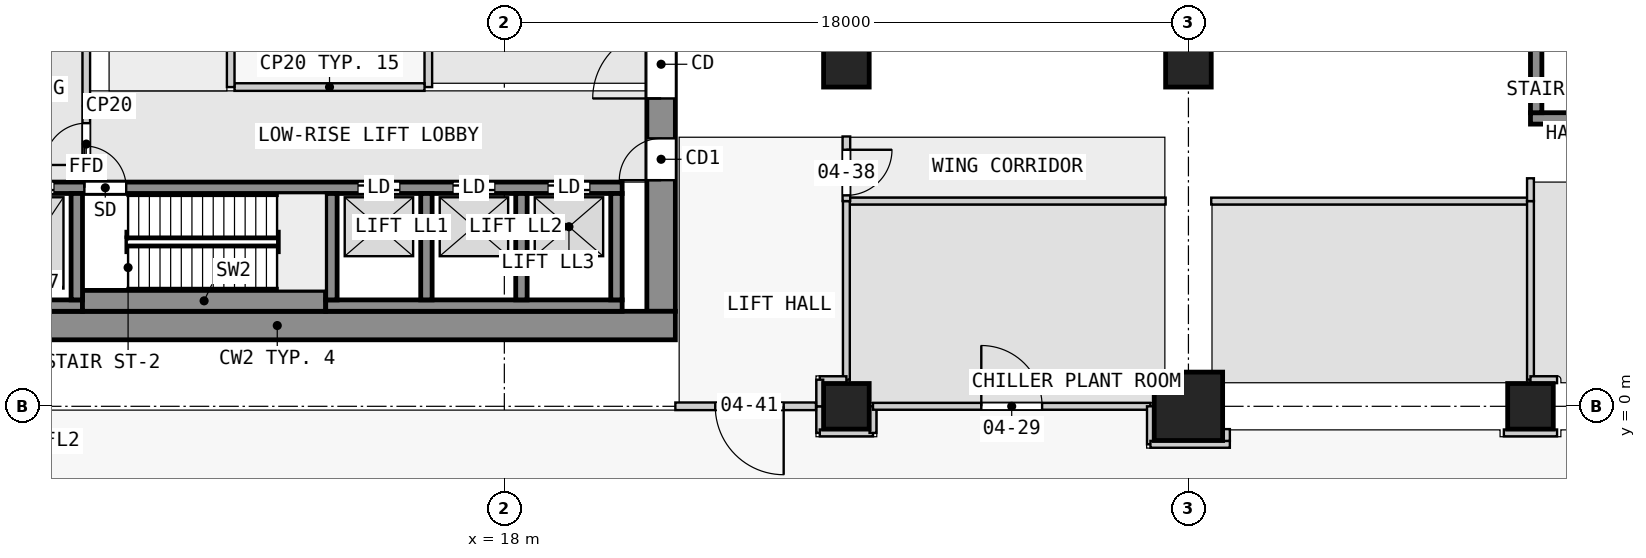
"""IFC4 building model, lengths in metres.
Left out: names, types, materials, properties, quantities, classifications, styles, units other than length and angle.
Written with IfcOpenShell. Run it as: python <this file> out.ifc"""

import sys

from ifc_helpers import new_model, si_unit, direction, frame, frame_2d, origin, origin_2d, place, context, subcontext, project, spatial, rectangle, extrude, element, fill, save


model = new_model("IFC4")
c1 = context("Model", 3, precision=1e-05, world=origin(), true_north=direction((0.0, 1.0)))
c2 = subcontext(c1, "Body", "Model", "MODEL_VIEW")
j1 = project(units=[si_unit("LENGTHUNIT", "METRE"), si_unit("PLANEANGLEUNIT", "RADIAN")], contexts=[c1])
p1 = place(None, origin())
s1 = spatial("IfcSite", under=j1, at=p1, CompositionType="ELEMENT")
p2 = place(p1, origin())
s2 = spatial("IfcBuilding", under=s1, at=p2, CompositionType="ELEMENT")
p3 = place(p2, frame((0.0, 0.0, 21.8)))
s3 = spatial("IfcBuildingStorey", under=s2, at=p3, CompositionType="ELEMENT", Elevation=21.8)
for number, where, z_axis, x_axis in (
    (1, (27.0, 0.0, 0.0), (0.0, 0.0, 1.0), (1.0, 0.0, 0.0)),
    (2, (27.0, 9.0, 0.0), (0.0, 0.0, 1.0), (1.0, 0.0, 0.0)),
):
    element("IfcColumn", number, at=place(p3, frame(where, z_axis=z_axis, x_axis=x_axis)), inside=s3, PredefinedType="COLUMN", context=c2, shape_type="SweptSolid", body=[
        extrude(rectangle(XDim=1.2, YDim=1.2, at=origin_2d()), origin(), (0.0, 0.0, 1.0), 5.0),
    ])
p4 = place(p3, frame((36.0, 0.0, 0.0), z_axis=(0.0, 0.0, 1.0), x_axis=(1.0, 0.0, 0.0)))
e3 = element("IfcColumn", 3, at=p4, inside=s3, PredefinedType="COLUMN", context=c2, shape_type="SweptSolid", body=[
    extrude(rectangle(XDim=1.8, YDim=1.8, at=origin_2d()), origin(), (0.0, 0.0, 1.0), 5.0),
])
for number, where, z_axis, x_axis in (
    (4, (36.0, 9.0, 0.0), (0.0, 0.0, 1.0), (1.0, 0.0, 0.0)),
    (5, (45.0, 0.0, 0.0), (0.0, 0.0, 1.0), (1.0, 0.0, 0.0)),
):
    element("IfcColumn", number, at=place(p3, frame(where, z_axis=z_axis, x_axis=x_axis)), inside=s3, PredefinedType="COLUMN", context=c2, shape_type="SweptSolid", body=[
        extrude(rectangle(XDim=1.2, YDim=1.2, at=origin_2d()), origin(), (0.0, 0.0, 1.0), 5.0),
    ])
p5 = place(p3, frame((1.55, 2.125, 0.0), z_axis=(0.0, 0.0, 1.0), x_axis=(1.0, 0.0, 0.0)))
e6 = element("IfcWall", 6, at=p5, inside=s3, PredefinedType="SHEAR", context=c2, shape_type="SweptSolid", body=[
    extrude(rectangle(XDim=20.95, YDim=0.75, at=frame_2d((10.475, 0.0))), origin(), (0.0, 0.0, 1.0), 4.5),
])
p6 = place(p3, frame((22.125, 2.5, 0.0), z_axis=(0.0, 0.0, 1.0), x_axis=(0.0, 1.0, 0.0)))
e7 = element("IfcWall", 7, at=p6, inside=s3, PredefinedType="SHEAR", context=c2, shape_type="SweptSolid", body=[
    extrude(rectangle(XDim=14.75, YDim=0.75, at=frame_2d((7.375, 0.0))), origin(), (0.0, 0.0, 1.0), 4.5),
])
p7 = place(p6, frame((5.6, 0.0, 0.0)))
e8 = element("IfcOpeningElement", 8, at=p7, cuts=e7, PredefinedType="OPENING", context=c2, shape_type="SweptSolid", body=[
    extrude(rectangle(XDim=1.8, YDim=2.1, at=frame_2d((0.9, 1.05))), frame((0.0, 0.385, 0.0), z_axis=(0.0, -1.0, 0.0), x_axis=(1.0, 0.0, 0.0)), (0.0, 0.0, 1.0), 0.77),
])
p8 = place(p6, frame((3.45, 0.0, 0.0)))
e9 = element("IfcOpeningElement", 9, at=p8, cuts=e7, PredefinedType="OPENING", context=c2, shape_type="SweptSolid", body=[
    extrude(rectangle(XDim=1.1, YDim=2.1, at=frame_2d((0.55, 1.05))), frame((0.0, 0.385, 0.0), z_axis=(0.0, -1.0, 0.0), x_axis=(1.0, 0.0, 0.0)), (0.0, 0.0, 1.0), 0.77),
])
p9 = place(p3, frame((2.3, 2.65, 0.0), z_axis=(0.0, 0.0, 1.0), x_axis=(1.0, 0.0, 0.0)))
e10 = element("IfcWall", 10, at=p9, inside=s3, PredefinedType="SHEAR", context=c2, shape_type="SweptSolid", body=[
    extrude(rectangle(XDim=4.6, YDim=0.3, at=frame_2d((2.3, 0.0))), origin(), (0.0, 0.0, 1.0), 4.5),
])
p10 = place(p3, frame((6.9, 2.775, 0.0), z_axis=(0.0, 0.0, 1.0), x_axis=(1.0, 0.0, 0.0)))
e11 = element("IfcWall", 11, at=p10, inside=s3, PredefinedType="SHEAR", context=c2, shape_type="SweptSolid", body=[
    extrude(rectangle(XDim=6.4, YDim=0.55, at=frame_2d((3.2, 0.0))), origin(), (0.0, 0.0, 1.0), 4.5),
])
p11 = place(p3, frame((13.3, 2.65, 0.0), z_axis=(0.0, 0.0, 1.0), x_axis=(1.0, 0.0, 0.0)))
e12 = element("IfcWall", 12, at=p11, inside=s3, PredefinedType="SHEAR", context=c2, shape_type="SweptSolid", body=[
    extrude(rectangle(XDim=7.8, YDim=0.3, at=frame_2d((3.9, 0.0))), origin(), (0.0, 0.0, 1.0), 4.5),
])
for number, where, z_axis, x_axis in (
    (13, (6.75, 2.8, 0.0), (0.0, 0.0, 1.0), (0.0, 1.0, 0.0)),
    (14, (13.45, 2.8, 0.0), (0.0, 0.0, 1.0), (0.0, 1.0, 0.0)),
    (15, (15.95, 2.8, 0.0), (0.0, 0.0, 1.0), (0.0, 1.0, 0.0)),
    (16, (18.45, 2.8, 0.0), (0.0, 0.0, 1.0), (0.0, 1.0, 0.0)),
    (17, (20.95, 2.8, 0.0), (0.0, 0.0, 1.0), (0.0, 1.0, 0.0)),
):
    element("IfcWall", number, at=place(p3, frame(where, z_axis=z_axis, x_axis=x_axis)), inside=s3, PredefinedType="SHEAR", context=c2, shape_type="SweptSolid", body=[
        extrude(rectangle(XDim=2.8, YDim=0.3, at=frame_2d((1.4, 0.0))), origin(), (0.0, 0.0, 1.0), 4.5),
    ])
p12 = place(p3, frame((2.3, 5.75, 0.0), z_axis=(0.0, 0.0, 1.0), x_axis=(1.0, 0.0, 0.0)))
e18 = element("IfcWall", 18, at=p12, inside=s3, PredefinedType="SHEAR", context=c2, shape_type="SweptSolid", body=[
    extrude(rectangle(XDim=18.8, YDim=0.3, at=frame_2d((9.4, 0.0))), origin(), (0.0, 0.0, 1.0), 4.5),
])
p13 = place(p12, frame((4.65, 0.0, 0.0)))
e19 = element("IfcOpeningElement", 19, at=p13, cuts=e18, PredefinedType="OPENING", context=c2, shape_type="SweptSolid", body=[
    extrude(rectangle(XDim=1.1, YDim=2.1, at=frame_2d((0.55, 1.05))), frame((0.0, 0.16, 0.0), z_axis=(0.0, -1.0, 0.0), x_axis=(1.0, 0.0, 0.0)), (0.0, 0.0, 1.0), 0.32),
])
p14 = place(p12, frame((0.45, 0.0, 0.0)))
e20 = element("IfcOpeningElement", 20, at=p14, cuts=e18, PredefinedType="OPENING", context=c2, shape_type="SweptSolid", body=[
    extrude(rectangle(XDim=1.1, YDim=2.1, at=frame_2d((0.55, 1.05))), frame((0.0, 0.16, 0.0), z_axis=(0.0, -1.0, 0.0), x_axis=(1.0, 0.0, 0.0)), (0.0, 0.0, 1.0), 0.32),
])
p15 = place(p12, frame((2.75, 0.0, 0.0)))
e21 = element("IfcOpeningElement", 21, at=p15, cuts=e18, PredefinedType="OPENING", context=c2, shape_type="SweptSolid", body=[
    extrude(rectangle(XDim=1.1, YDim=2.1, at=frame_2d((0.55, 1.05))), frame((0.0, 0.16, 0.0), z_axis=(0.0, -1.0, 0.0), x_axis=(1.0, 0.0, 0.0)), (0.0, 0.0, 1.0), 0.32),
])
p16 = place(p12, frame((11.85, 0.0, 0.0)))
e22 = element("IfcOpeningElement", 22, at=p16, cuts=e18, PredefinedType="OPENING", context=c2, shape_type="SweptSolid", body=[
    extrude(rectangle(XDim=1.1, YDim=2.1, at=frame_2d((0.55, 1.05))), frame((0.0, 0.16, 0.0), z_axis=(0.0, -1.0, 0.0), x_axis=(1.0, 0.0, 0.0)), (0.0, 0.0, 1.0), 0.32),
])
p17 = place(p12, frame((14.35, 0.0, 0.0)))
e23 = element("IfcOpeningElement", 23, at=p17, cuts=e18, PredefinedType="OPENING", context=c2, shape_type="SweptSolid", body=[
    extrude(rectangle(XDim=1.1, YDim=2.1, at=frame_2d((0.55, 1.05))), frame((0.0, 0.16, 0.0), z_axis=(0.0, -1.0, 0.0), x_axis=(1.0, 0.0, 0.0)), (0.0, 0.0, 1.0), 0.32),
])
p18 = place(p12, frame((16.85, 0.0, 0.0)))
e24 = element("IfcOpeningElement", 24, at=p18, cuts=e18, PredefinedType="OPENING", context=c2, shape_type="SweptSolid", body=[
    extrude(rectangle(XDim=1.1, YDim=2.1, at=frame_2d((0.55, 1.05))), frame((0.0, 0.16, 0.0), z_axis=(0.0, -1.0, 0.0), x_axis=(1.0, 0.0, 0.0)), (0.0, 0.0, 1.0), 0.32),
])
p19 = place(p3, frame((45.15, 7.725, 0.0), z_axis=(0.0, 0.0, 1.0), x_axis=(0.0, 1.0, 0.0)))
e25 = element("IfcWall", 25, at=p19, inside=s3, PredefinedType="SHEAR", context=c2, shape_type="SweptSolid", body=[
    extrude(rectangle(XDim=2.55, YDim=0.3, at=frame_2d((1.275, 0.0))), origin(), (0.0, 0.0, 1.0), 5.0),
])
p20 = place(p3, frame((45.0, 7.575, 0.0), z_axis=(0.0, 0.0, 1.0), x_axis=(1.0, 0.0, 0.0)))
e26 = element("IfcWall", 26, at=p20, inside=s3, PredefinedType="SHEAR", context=c2, shape_type="SweptSolid", body=[
    extrude(rectangle(XDim=7.2, YDim=0.3, at=frame_2d((3.6, 0.0))), origin(), (0.0, 0.0, 1.0), 5.0),
])
p21 = place(p3, frame((7.0, 5.9, 0.0), z_axis=(0.0, 0.0, 1.0), x_axis=(0.0, 1.0, 0.0)))
e27 = element("IfcWall", 27, at=p21, inside=s3, PredefinedType="PARTITIONING", context=c2, shape_type="SweptSolid", body=[
    extrude(rectangle(XDim=4.0, YDim=0.2, at=frame_2d((2.0, 0.0))), origin(), (0.0, 0.0, 1.0), 4.5),
])
p22 = place(p21, frame((0.45, 0.0, 0.0)))
e28 = element("IfcOpeningElement", 28, at=p22, cuts=e27, PredefinedType="OPENING", context=c2, shape_type="SweptSolid", body=[
    extrude(rectangle(XDim=1.1, YDim=2.1, at=frame_2d((0.55, 1.05))), frame((0.0, 0.11, 0.0), z_axis=(0.0, -1.0, 0.0), x_axis=(1.0, 0.0, 0.0)), (0.0, 0.0, 1.0), 0.22),
])
p23 = place(p3, frame((10.8, 8.4, 0.0), z_axis=(0.0, 0.0, 1.0), x_axis=(0.0, 1.0, 0.0)))
e29 = element("IfcWall", 29, at=p23, inside=s3, PredefinedType="PARTITIONING", context=c2, shape_type="SweptSolid", body=[
    extrude(rectangle(XDim=6.2, YDim=0.2, at=frame_2d((3.1, 0.0))), origin(), (0.0, 0.0, 1.0), 4.5),
])
p24 = place(p3, frame((10.9, 8.4, 0.0), z_axis=(0.0, 0.0, 1.0), x_axis=(1.0, 0.0, 0.0)))
e30 = element("IfcWall", 30, at=p24, inside=s3, PredefinedType="PARTITIONING", context=c2, shape_type="SweptSolid", body=[
    extrude(rectangle(XDim=5.0, YDim=0.2, at=frame_2d((2.5, 0.0))), origin(), (0.0, 0.0, 1.0), 4.5),
])
p25 = place(p3, frame((16.0, 8.4, 0.0), z_axis=(0.0, 0.0, 1.0), x_axis=(0.0, 1.0, 0.0)))
e31 = element("IfcWall", 31, at=p25, inside=s3, PredefinedType="PARTITIONING", context=c2, shape_type="SweptSolid", body=[
    extrude(rectangle(XDim=6.2, YDim=0.2, at=frame_2d((3.1, 0.0))), origin(), (0.0, 0.0, 1.0), 4.5),
])
p26 = place(p25, frame((3.15, 0.0, 0.0)))
e32 = element("IfcOpeningElement", 32, at=p26, cuts=e31, PredefinedType="OPENING", context=c2, shape_type="SweptSolid", body=[
    extrude(rectangle(XDim=0.9, YDim=2.1, at=frame_2d((0.45, 1.05))), frame((0.0, 0.11, 0.0), z_axis=(0.0, -1.0, 0.0), x_axis=(1.0, 0.0, 0.0)), (0.0, 0.0, 1.0), 0.22),
])
p27 = place(p3, frame((26.3, 0.0, 0.0), z_axis=(0.0, 0.0, 1.0), x_axis=(0.0, -1.0, 0.0)))
e33 = element("IfcWall", 33, at=p27, inside=s3, PredefinedType="PARTITIONING", context=c2, shape_type="SweptSolid", body=[
    extrude(rectangle(XDim=0.7, YDim=0.18, at=frame_2d((0.35, 0.0))), origin(), (0.0, 0.0, 1.0), 4.5),
])
p28 = place(p3, frame((26.3, -0.7, 0.0), z_axis=(0.0, 0.0, 1.0), x_axis=(1.0, 0.0, 0.0)))
e34 = element("IfcWall", 34, at=p28, inside=s3, PredefinedType="PARTITIONING", context=c2, shape_type="SweptSolid", body=[
    extrude(rectangle(XDim=1.4, YDim=0.18, at=frame_2d((0.7, 0.0))), origin(), (0.0, 0.0, 1.0), 4.5),
])
p29 = place(p3, frame((27.7, -0.7, 0.0), z_axis=(0.0, 0.0, 1.0), x_axis=(0.0, 1.0, 0.0)))
e35 = element("IfcWall", 35, at=p29, inside=s3, PredefinedType="PARTITIONING", context=c2, shape_type="SweptSolid", body=[
    extrude(rectangle(XDim=0.7, YDim=0.18, at=frame_2d((0.35, 0.0))), origin(), (0.0, 0.0, 1.0), 4.5),
])
p30 = place(p3, frame((27.7, 0.0, 0.0), z_axis=(0.0, 0.0, 1.0), x_axis=(1.0, 0.0, 0.0)))
e36 = element("IfcWall", 36, at=p30, inside=s3, PredefinedType="PARTITIONING", context=c2, shape_type="SweptSolid", body=[
    extrude(rectangle(XDim=7.3, YDim=0.18, at=frame_2d((3.65, 0.0))), origin(), (0.0, 0.0, 1.0), 4.5),
])
p31 = place(p30, frame((2.85, 0.0, 0.0)))
e37 = element("IfcOpeningElement", 37, at=p31, cuts=e36, PredefinedType="OPENING", context=c2, shape_type="SweptSolid", body=[
    extrude(rectangle(XDim=1.6, YDim=2.4, at=frame_2d((0.8, 1.2))), frame((0.0, 0.1, 0.0), z_axis=(0.0, -1.0, 0.0), x_axis=(1.0, 0.0, 0.0)), (0.0, 0.0, 1.0), 0.2),
])
p32 = place(p3, frame((35.0, 0.0, 0.0), z_axis=(0.0, 0.0, 1.0), x_axis=(0.0, -1.0, 0.0)))
e38 = element("IfcWall", 38, at=p32, inside=s3, PredefinedType="PARTITIONING", context=c2, shape_type="SweptSolid", body=[
    extrude(rectangle(XDim=1.0, YDim=0.18, at=frame_2d((0.5, 0.0))), origin(), (0.0, 0.0, 1.0), 4.5),
])
p33 = place(p3, frame((35.0, -1.0, 0.0), z_axis=(0.0, 0.0, 1.0), x_axis=(1.0, 0.0, 0.0)))
e39 = element("IfcWall", 39, at=p33, inside=s3, PredefinedType="PARTITIONING", context=c2, shape_type="SweptSolid", body=[
    extrude(rectangle(XDim=2.09, YDim=0.18, at=frame_2d((1.045, 0.0))), origin(), (0.0, 0.0, 1.0), 4.5),
])
p34 = place(p3, frame((37.0, -0.91, 0.0), z_axis=(0.0, 0.0, 1.0), x_axis=(0.0, 1.0, 0.0)))
e40 = element("IfcWall", 40, at=p34, inside=s3, PredefinedType="PARTITIONING", context=c2, shape_type="SweptSolid", body=[
    extrude(rectangle(XDim=0.31, YDim=0.18, at=frame_2d((0.155, 0.0))), origin(), (0.0, 0.0, 1.0), 4.5),
])
p35 = place(p3, frame((44.3, -0.7, 0.0), z_axis=(0.0, 0.0, 1.0), x_axis=(1.0, 0.0, 0.0)))
e41 = element("IfcWall", 41, at=p35, inside=s3, PredefinedType="PARTITIONING", context=c2, shape_type="SweptSolid", body=[
    extrude(rectangle(XDim=1.4, YDim=0.18, at=frame_2d((0.7, 0.0))), origin(), (0.0, 0.0, 1.0), 4.5),
])
for number, where, z_axis, x_axis in (
    (42, (35.4, 5.4, 0.0), (0.0, 0.0, 1.0), (-1.0, 0.0, 0.0)),
    (43, (45.0, 5.4, 0.0), (0.0, 0.0, 1.0), (-1.0, 0.0, 0.0)),
):
    element("IfcWall", number, at=place(p3, frame(where, z_axis=z_axis, x_axis=x_axis)), inside=s3, PredefinedType="PARTITIONING", context=c2, shape_type="SweptSolid", body=[
        extrude(rectangle(XDim=8.4, YDim=0.18, at=frame_2d((4.2, 0.0))), origin(), (0.0, 0.0, 1.0), 4.5),
    ])
p36 = place(p3, frame((27.0, 5.4, 0.0), z_axis=(0.0, 0.0, 1.0), x_axis=(0.0, -1.0, 0.0)))
e44 = element("IfcWall", 44, at=p36, inside=s3, PredefinedType="PARTITIONING", context=c2, shape_type="SweptSolid", body=[
    extrude(rectangle(XDim=4.7, YDim=0.18, at=frame_2d((2.35, 0.0))), origin(), (0.0, 0.0, 1.0), 4.5),
])
for number, where, z_axis, x_axis in (
    (45, (27.0, 0.7, 0.0), (0.0, 0.0, 1.0), (-1.0, 0.0, 0.0)),
    (46, (26.3, 0.7, 0.0), (0.0, 0.0, 1.0), (0.0, -1.0, 0.0)),
):
    element("IfcWall", number, at=place(p3, frame(where, z_axis=z_axis, x_axis=x_axis)), inside=s3, PredefinedType="PARTITIONING", context=c2, shape_type="SweptSolid", body=[
        extrude(rectangle(XDim=0.7, YDim=0.18, at=frame_2d((0.35, 0.0))), origin(), (0.0, 0.0, 1.0), 4.5),
    ])
p37 = place(p3, frame((45.0, 5.4, 0.0), z_axis=(0.0, 0.0, 1.0), x_axis=(0.0, -1.0, 0.0)))
e47 = element("IfcWall", 47, at=p37, inside=s3, PredefinedType="PARTITIONING", context=c2, shape_type="SweptSolid", body=[
    extrude(rectangle(XDim=4.7, YDim=0.18, at=frame_2d((2.35, 0.0))), origin(), (0.0, 0.0, 1.0), 4.5),
])
p38 = place(p3, frame((45.0, 0.7, 0.0), z_axis=(0.0, 0.0, 1.0), x_axis=(1.0, 0.0, 0.0)))
e48 = element("IfcWall", 48, at=p38, inside=s3, PredefinedType="PARTITIONING", context=c2, shape_type="SweptSolid", body=[
    extrude(rectangle(XDim=0.7, YDim=0.18, at=frame_2d((0.35, 0.0))), origin(), (0.0, 0.0, 1.0), 4.5),
])
p39 = place(p3, frame((27.0, 7.1, 0.0), z_axis=(0.0, 0.0, 1.0), x_axis=(0.0, -1.0, 0.0)))
e49 = element("IfcWall", 49, at=p39, inside=s3, PredefinedType="PARTITIONING", context=c2, shape_type="SweptSolid", body=[
    extrude(rectangle(XDim=1.7, YDim=0.2, at=frame_2d((0.85, 0.0))), origin(), (0.0, 0.0, 1.0), 4.5),
])
p40 = place(p39, frame((0.35, 0.0, 0.0)))
e50 = element("IfcOpeningElement", 50, at=p40, cuts=e49, PredefinedType="OPENING", context=c2, shape_type="SweptSolid", body=[
    extrude(rectangle(XDim=1.2, YDim=2.1, at=frame_2d((0.6, 1.05))), frame((0.0, 0.11, 0.0), z_axis=(0.0, -1.0, 0.0), x_axis=(1.0, 0.0, 0.0)), (0.0, 0.0, 1.0), 0.22),
])
p41 = place(p3, frame((26.2, 0.0, 0.0), z_axis=(0.0, 0.0, 1.0), x_axis=(-1.0, 0.0, 0.0)))
e51 = element("IfcWall", 51, at=p41, inside=s3, PredefinedType="PARTITIONING", context=c2, shape_type="SweptSolid", body=[
    extrude(rectangle(XDim=3.7, YDim=0.2, at=frame_2d((1.85, 0.0))), origin(), (0.0, 0.0, 1.0), 4.5),
])
p42 = place(p41, frame((0.85, 0.0, 0.0)))
e52 = element("IfcOpeningElement", 52, at=p42, cuts=e51, PredefinedType="OPENING", context=c2, shape_type="SweptSolid", body=[
    extrude(rectangle(XDim=1.8, YDim=2.1, at=frame_2d((0.9, 1.05))), frame((0.0, 0.11, 0.0), z_axis=(0.0, -1.0, 0.0), x_axis=(1.0, 0.0, 0.0)), (0.0, 0.0, 1.0), 0.22),
])
p43 = place(p3, frame((45.0, 6.0, 0.0), z_axis=(0.0, 0.0, 1.0), x_axis=(0.0, -1.0, 0.0)))
e53 = element("IfcWall", 53, at=p43, inside=s3, PredefinedType="PARTITIONING", context=c2, shape_type="SweptSolid", body=[
    extrude(rectangle(XDim=0.6, YDim=0.18, at=frame_2d((0.3, 0.0))), origin(), (0.0, 0.0, 1.0), 4.5),
])
p44 = place(p22, origin())
e54 = element("IfcDoor", 54, at=p44, inside=s3, OperationType="SINGLE_SWING_LEFT", PredefinedType="DOOR", context=c2, shape_type="SweptSolid", body=[
    extrude(rectangle(XDim=1.1, YDim=2.1, at=frame_2d((0.55, 1.05))), frame((0.0, 0.025, 0.0), z_axis=(0.0, -1.0, 0.0), x_axis=(1.0, 0.0, 0.0)), (0.0, 0.0, 1.0), 0.05),
])
fill(e28, e54)
p45 = place(p13, origin())
e55 = element("IfcDoor", 55, at=p45, inside=s3, OperationType="SINGLE_SWING_LEFT", PredefinedType="DOOR", context=c2, shape_type="SweptSolid", body=[
    extrude(rectangle(XDim=1.1, YDim=2.1, at=frame_2d((0.55, 1.05))), frame((0.0, 0.025, 0.0), z_axis=(0.0, -1.0, 0.0), x_axis=(1.0, 0.0, 0.0)), (0.0, 0.0, 1.0), 0.05),
])
fill(e19, e55)
p46 = place(p15, origin())
e56 = element("IfcDoor", 56, at=p46, inside=s3, OperationType="DOUBLE_DOOR_SLIDING", PredefinedType="DOOR", context=c2, shape_type="SweptSolid", body=[
    extrude(rectangle(XDim=1.1, YDim=2.1, at=frame_2d((0.55, 1.05))), frame((0.0, 0.025, 0.0), z_axis=(0.0, -1.0, 0.0), x_axis=(1.0, 0.0, 0.0)), (0.0, 0.0, 1.0), 0.05),
])
fill(e21, e56)
p47 = place(p16, origin())
e57 = element("IfcDoor", 57, at=p47, inside=s3, OperationType="DOUBLE_DOOR_SLIDING", PredefinedType="DOOR", context=c2, shape_type="SweptSolid", body=[
    extrude(rectangle(XDim=1.1, YDim=2.1, at=frame_2d((0.55, 1.05))), frame((0.0, 0.025, 0.0), z_axis=(0.0, -1.0, 0.0), x_axis=(1.0, 0.0, 0.0)), (0.0, 0.0, 1.0), 0.05),
])
fill(e22, e57)
p48 = place(p17, origin())
e58 = element("IfcDoor", 58, at=p48, inside=s3, OperationType="DOUBLE_DOOR_SLIDING", PredefinedType="DOOR", context=c2, shape_type="SweptSolid", body=[
    extrude(rectangle(XDim=1.1, YDim=2.1, at=frame_2d((0.55, 1.05))), frame((0.0, 0.025, 0.0), z_axis=(0.0, -1.0, 0.0), x_axis=(1.0, 0.0, 0.0)), (0.0, 0.0, 1.0), 0.05),
])
fill(e23, e58)
p49 = place(p18, origin())
e59 = element("IfcDoor", 59, at=p49, inside=s3, OperationType="DOUBLE_DOOR_SLIDING", PredefinedType="DOOR", context=c2, shape_type="SweptSolid", body=[
    extrude(rectangle(XDim=1.1, YDim=2.1, at=frame_2d((0.55, 1.05))), frame((0.0, 0.025, 0.0), z_axis=(0.0, -1.0, 0.0), x_axis=(1.0, 0.0, 0.0)), (0.0, 0.0, 1.0), 0.05),
])
fill(e24, e59)
p50 = place(p7, origin())
e60 = element("IfcDoor", 60, at=p50, inside=s3, OperationType="DOUBLE_DOOR_SINGLE_SWING", PredefinedType="DOOR", context=c2, shape_type="SweptSolid", body=[
    extrude(rectangle(XDim=1.8, YDim=2.1, at=frame_2d((0.9, 1.05))), frame((0.0, 0.025, 0.0), z_axis=(0.0, -1.0, 0.0), x_axis=(1.0, 0.0, 0.0)), (0.0, 0.0, 1.0), 0.05),
])
fill(e8, e60)
p51 = place(p8, origin())
e61 = element("IfcDoor", 61, at=p51, inside=s3, OperationType="SINGLE_SWING_RIGHT", PredefinedType="DOOR", context=c2, shape_type="SweptSolid", body=[
    extrude(rectangle(XDim=1.1, YDim=2.1, at=frame_2d((0.55, 1.05))), frame((0.0, 0.025, 0.0), z_axis=(0.0, -1.0, 0.0), x_axis=(1.0, 0.0, 0.0)), (0.0, 0.0, 1.0), 0.05),
])
fill(e9, e61)
p52 = place(p31, origin())
e62 = element("IfcDoor", 62, at=p52, inside=s3, OperationType="SINGLE_SWING_LEFT", PredefinedType="DOOR", context=c2, shape_type="SweptSolid", body=[
    extrude(rectangle(XDim=1.6, YDim=2.4, at=frame_2d((0.8, 1.2))), frame((0.0, 0.025, 0.0), z_axis=(0.0, -1.0, 0.0), x_axis=(1.0, 0.0, 0.0)), (0.0, 0.0, 1.0), 0.05),
])
fill(e37, e62)
p53 = place(p40, origin())
e63 = element("IfcDoor", 63, at=p53, inside=s3, OperationType="SINGLE_SWING_LEFT", PredefinedType="DOOR", context=c2, shape_type="SweptSolid", body=[
    extrude(rectangle(XDim=1.2, YDim=2.1, at=frame_2d((0.6, 1.05))), frame((0.0, 0.025, 0.0), z_axis=(0.0, -1.0, 0.0), x_axis=(1.0, 0.0, 0.0)), (0.0, 0.0, 1.0), 0.05),
])
fill(e50, e63)
p54 = place(p42, origin())
e64 = element("IfcDoor", 64, at=p54, inside=s3, OperationType="DOUBLE_DOOR_SINGLE_SWING", PredefinedType="DOOR", context=c2, shape_type="SweptSolid", body=[
    extrude(rectangle(XDim=1.8, YDim=2.1, at=frame_2d((0.9, 1.05))), frame((0.0, 0.025, 0.0), z_axis=(0.0, -1.0, 0.0), x_axis=(1.0, 0.0, 0.0)), (0.0, 0.0, 1.0), 0.05),
])
fill(e52, e64)
save(model, sys.argv[1])
